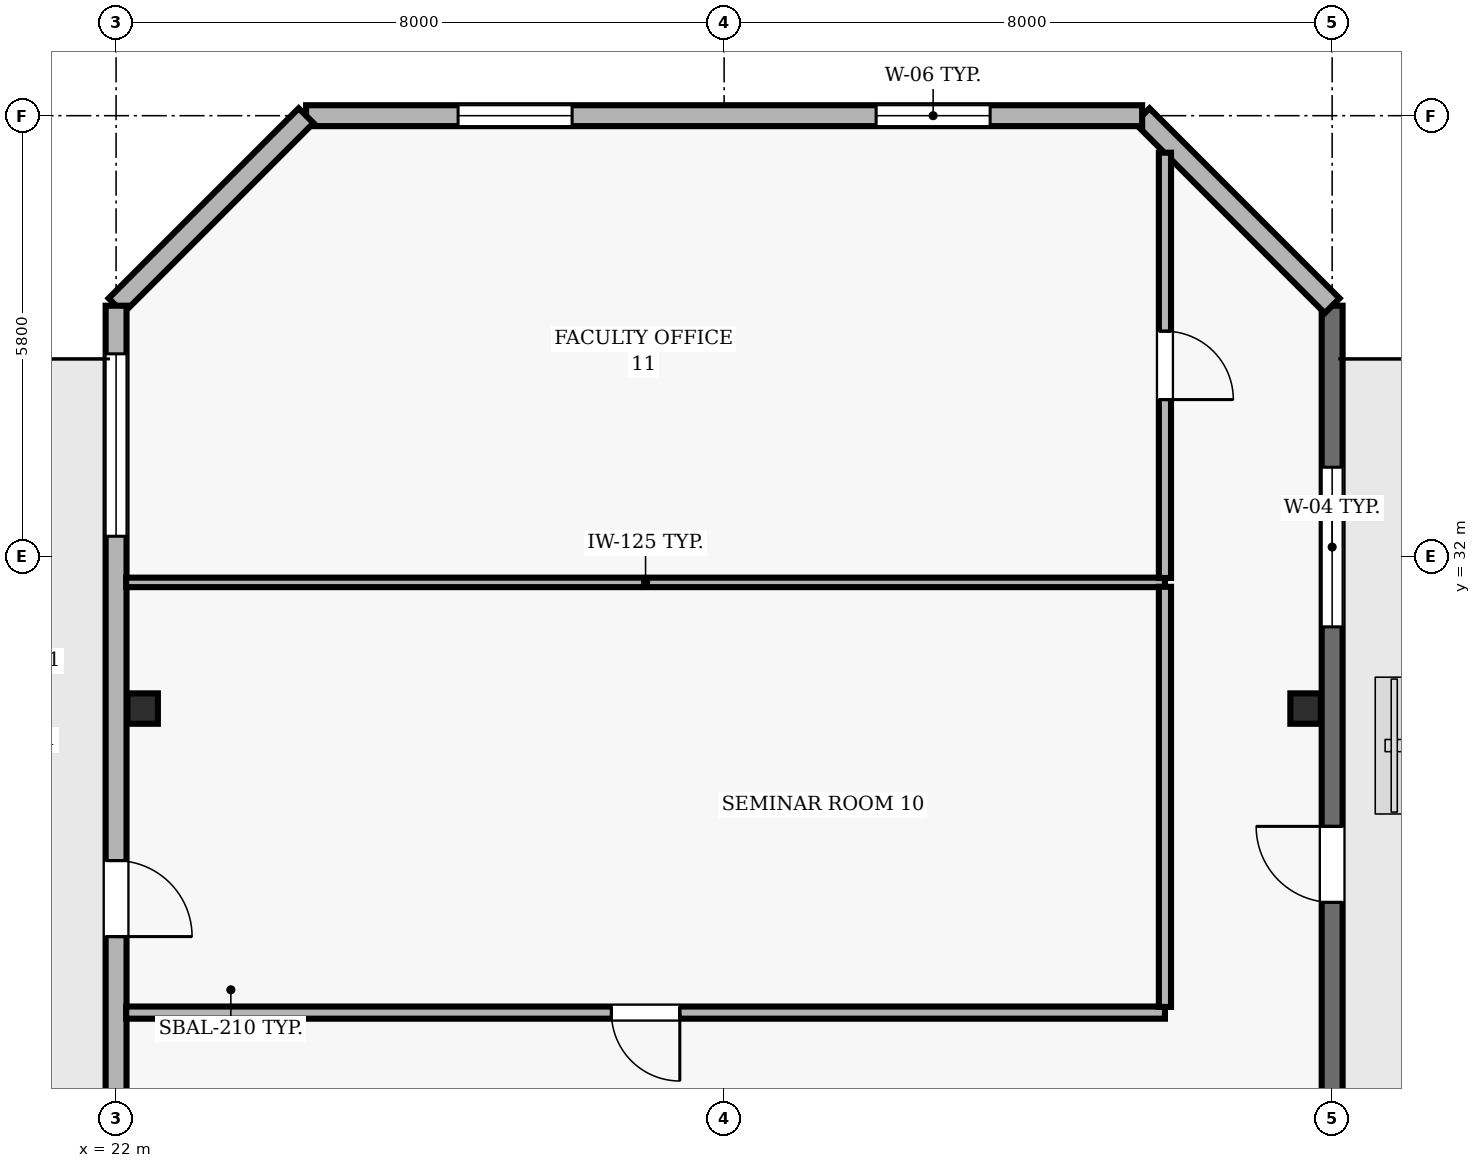
"""IFC4 building model, lengths in metres.
Left out: names, types, materials, properties, quantities, classifications, styles, units other than length and angle.
Written with IfcOpenShell. Run it as: python <this file> out.ifc"""

import sys

from ifc_helpers import new_model, si_unit, direction, frame, frame_2d, origin, origin_2d, place, context, subcontext, project, spatial, rectangle, hollow_rectangle, extrude, element, fill, save


model = new_model("IFC4")
c1 = context("Model", 3, precision=1e-05, world=origin(), true_north=direction((0.0, 1.0)))
c2 = subcontext(c1, "Body", "Model", "MODEL_VIEW")
j1 = project(units=[si_unit("LENGTHUNIT", "METRE"), si_unit("PLANEANGLEUNIT", "RADIAN")], contexts=[c1])
p1 = place(None, origin())
s1 = spatial("IfcSite", under=j1, at=p1, CompositionType="ELEMENT")
p2 = place(p1, origin())
s2 = spatial("IfcBuilding", under=s1, at=p2, CompositionType="ELEMENT")
p3 = place(p2, frame((0.0, 0.0, 275.5)))
s3 = spatial("IfcBuildingStorey", under=s2, at=p3, CompositionType="ELEMENT", Elevation=275.5)
for number, where, z_axis, x_axis in (
    (1, (22.35, 30.0, 0.0), (0.0, 0.0, 1.0), (1.0, 0.0, 0.0)),
    (2, (37.65, 30.0, 0.0), (0.0, 0.0, 1.0), (1.0, 0.0, 0.0)),
):
    element("IfcColumn", number, at=place(p3, frame(where, z_axis=z_axis, x_axis=x_axis)), inside=s3, PredefinedType="COLUMN", context=c2, shape_type="SweptSolid", body=[
        extrude(hollow_rectangle(XDim=0.4, YDim=0.4, WallThickness=0.02, at=origin_2d()), origin(), (0.0, 0.0, 1.0), 3.9),
    ])
p4 = place(p3, frame((38.0, 22.6, 0.0), z_axis=(0.0, 0.0, 1.0), x_axis=(0.0, 1.0, 0.0)))
e3 = element("IfcWall", 3, at=p4, inside=s3, PredefinedType="SOLIDWALL", context=c2, shape_type="SweptSolid", body=[
    extrude(rectangle(XDim=12.7, YDim=0.275, at=frame_2d((6.35, 0.0))), origin(), (0.0, 0.0, 1.0), 3.69),
])
p5 = place(p4, frame((4.85, 0.0, 0.0)))
e4 = element("IfcOpeningElement", 4, at=p5, cuts=e3, PredefinedType="OPENING", context=c2, shape_type="SweptSolid", body=[
    extrude(rectangle(XDim=1.0, YDim=2.2, at=frame_2d((0.5, 1.1))), frame((0.0, 0.147, 0.0), z_axis=(0.0, -1.0, 0.0), x_axis=(1.0, 0.0, 0.0)), (0.0, 0.0, 1.0), 0.295),
])
p6 = place(p4, frame((8.475, 0.0, 0.9)))
e5 = element("IfcOpeningElement", 5, at=p6, cuts=e3, PredefinedType="OPENING", context=c2, shape_type="SweptSolid", body=[
    extrude(rectangle(XDim=2.1, YDim=1.6, at=frame_2d((1.05, 0.8))), frame((0.0, 0.147, 0.0), z_axis=(0.0, -1.0, 0.0), x_axis=(1.0, 0.0, 0.0)), (0.0, 0.0, 1.0), 0.295),
])
p7 = place(p3, frame((38.0, 35.3, 0.0), z_axis=(0.0, 0.0, 1.0), x_axis=(-0.707106781187, 0.707106781187, 0.0)))
e6 = element("IfcWall", 6, at=p7, inside=s3, PredefinedType="SOLIDWALL", context=c2, shape_type="SweptSolid", body=[
    extrude(rectangle(XDim=3.536, YDim=0.275, at=frame_2d((1.768, 0.0))), origin(), (0.0, 0.0, 1.0), 3.69),
])
p8 = place(p3, frame((35.5, 37.8, 0.0), z_axis=(0.0, 0.0, 1.0), x_axis=(-1.0, 0.0, 0.0)))
e7 = element("IfcWall", 7, at=p8, inside=s3, PredefinedType="SOLIDWALL", context=c2, shape_type="SweptSolid", body=[
    extrude(rectangle(XDim=11.0, YDim=0.275, at=frame_2d((5.5, 0.0))), origin(), (0.0, 0.0, 1.0), 3.69),
])
p9 = place(p8, frame((2.0, 0.0, 0.9)))
e8 = element("IfcOpeningElement", 8, at=p9, cuts=e7, PredefinedType="OPENING", context=c2, shape_type="SweptSolid", body=[
    extrude(rectangle(XDim=1.5, YDim=1.8, at=frame_2d((0.75, 0.9))), frame((0.0, 0.147, 0.0), z_axis=(0.0, -1.0, 0.0), x_axis=(1.0, 0.0, 0.0)), (0.0, 0.0, 1.0), 0.295),
])
p10 = place(p8, frame((7.5, 0.0, 0.9)))
e9 = element("IfcOpeningElement", 9, at=p10, cuts=e7, PredefinedType="OPENING", context=c2, shape_type="SweptSolid", body=[
    extrude(rectangle(XDim=1.5, YDim=1.8, at=frame_2d((0.75, 0.9))), frame((0.0, 0.147, 0.0), z_axis=(0.0, -1.0, 0.0), x_axis=(1.0, 0.0, 0.0)), (0.0, 0.0, 1.0), 0.295),
])
p11 = place(p3, frame((24.5, 37.8, 0.0), z_axis=(0.0, 0.0, 1.0), x_axis=(-0.707106781187, -0.707106781187, 0.0)))
e10 = element("IfcWall", 10, at=p11, inside=s3, PredefinedType="SOLIDWALL", context=c2, shape_type="SweptSolid", body=[
    extrude(rectangle(XDim=3.536, YDim=0.275, at=frame_2d((1.768, 0.0))), origin(), (0.0, 0.0, 1.0), 3.69),
])
p12 = place(p3, frame((22.0, 35.3, 0.0), z_axis=(0.0, 0.0, 1.0), x_axis=(0.0, -1.0, 0.0)))
e11 = element("IfcWall", 11, at=p12, inside=s3, PredefinedType="SOLIDWALL", context=c2, shape_type="SweptSolid", body=[
    extrude(rectangle(XDim=32.8, YDim=0.275, at=frame_2d((16.4, 0.0))), origin(), (0.0, 0.0, 1.0), 3.69),
])
p13 = place(p12, frame((7.3, 0.0, 0.0)))
e12 = element("IfcOpeningElement", 12, at=p13, cuts=e11, PredefinedType="OPENING", context=c2, shape_type="SweptSolid", body=[
    extrude(rectangle(XDim=1.0, YDim=2.2, at=frame_2d((0.5, 1.1))), frame((0.0, 0.147, 0.0), z_axis=(0.0, -1.0, 0.0), x_axis=(1.0, 0.0, 0.0)), (0.0, 0.0, 1.0), 0.295),
])
p14 = place(p12, frame((0.633, 0.0, 0.9)))
e13 = element("IfcOpeningElement", 13, at=p14, cuts=e11, PredefinedType="OPENING", context=c2, shape_type="SweptSolid", body=[
    extrude(rectangle(XDim=2.4, YDim=1.8, at=frame_2d((1.2, 0.9))), frame((0.0, 0.147, 0.0), z_axis=(0.0, -1.0, 0.0), x_axis=(1.0, 0.0, 0.0)), (0.0, 0.0, 1.0), 0.295),
])
p15 = place(p12, frame((12.917, 0.0, 0.9)))
e14 = element("IfcOpeningElement", 14, at=p15, cuts=e11, PredefinedType="OPENING", context=c2, shape_type="SweptSolid", body=[
    extrude(rectangle(XDim=2.4, YDim=1.8, at=frame_2d((1.2, 0.9))), frame((0.0, 0.147, 0.0), z_axis=(0.0, -1.0, 0.0), x_axis=(1.0, 0.0, 0.0)), (0.0, 0.0, 1.0), 0.295),
])
p16 = place(p12, frame((17.483, 0.0, 0.9)))
e15 = element("IfcOpeningElement", 15, at=p16, cuts=e11, PredefinedType="OPENING", context=c2, shape_type="SweptSolid", body=[
    extrude(rectangle(XDim=2.4, YDim=1.8, at=frame_2d((1.2, 0.9))), frame((0.0, 0.147, 0.0), z_axis=(0.0, -1.0, 0.0), x_axis=(1.0, 0.0, 0.0)), (0.0, 0.0, 1.0), 0.295),
])
p17 = place(p12, frame((23.4, 0.0, 0.9)))
e16 = element("IfcOpeningElement", 16, at=p17, cuts=e11, PredefinedType="OPENING", context=c2, shape_type="SweptSolid", body=[
    extrude(rectangle(XDim=2.4, YDim=1.8, at=frame_2d((1.2, 0.9))), frame((0.0, 0.147, 0.0), z_axis=(0.0, -1.0, 0.0), x_axis=(1.0, 0.0, 0.0)), (0.0, 0.0, 1.0), 0.295),
])
p18 = place(p3, frame((35.8, 26.0, 0.0), z_axis=(0.0, 0.0, 1.0), x_axis=(-1.0, 0.0, 0.0)))
e17 = element("IfcWall", 17, at=p18, inside=s3, PredefinedType="PARTITIONING", context=c2, shape_type="SweptSolid", body=[
    extrude(rectangle(XDim=13.667, YDim=0.16, at=frame_2d((6.833, 0.0))), origin(), (0.0, 0.0, 1.0), 3.69),
])
p19 = place(p18, frame((6.383, 0.0, 0.0)))
e18 = element("IfcOpeningElement", 18, at=p19, cuts=e17, PredefinedType="OPENING", context=c2, shape_type="SweptSolid", body=[
    extrude(rectangle(XDim=0.9, YDim=2.1, at=frame_2d((0.45, 1.05))), frame((0.0, 0.09, 0.0), z_axis=(0.0, -1.0, 0.0), x_axis=(1.0, 0.0, 0.0)), (0.0, 0.0, 1.0), 0.18),
])
p20 = place(p3, frame((35.8, 31.66, 0.0), z_axis=(0.0, 0.0, 1.0), x_axis=(-1.0, 0.0, 0.0)))
e19 = element("IfcWall", 19, at=p20, inside=s3, PredefinedType="PARTITIONING", context=c2, shape_type="SweptSolid", body=[
    extrude(rectangle(XDim=13.667, YDim=0.125, at=frame_2d((6.833, 0.0))), origin(), (0.0, 0.0, 1.0), 3.69),
])
p21 = place(p3, frame((35.8, 31.602, 0.0), z_axis=(0.0, 0.0, 1.0), x_axis=(0.0, -1.0, 0.0)))
e20 = element("IfcWall", 20, at=p21, inside=s3, PredefinedType="PARTITIONING", context=c2, shape_type="SweptSolid", body=[
    extrude(rectangle(XDim=5.527, YDim=0.16, at=frame_2d((2.764, 0.0))), origin(), (0.0, 0.0, 1.0), 3.69),
])
p22 = place(p3, frame((35.8, 37.313, 0.0), z_axis=(0.0, 0.0, 1.0), x_axis=(0.0, -1.0, 0.0)))
e21 = element("IfcWall", 21, at=p22, inside=s3, PredefinedType="PARTITIONING", context=c2, shape_type="SweptSolid", body=[
    extrude(rectangle(XDim=5.595, YDim=0.16, at=frame_2d((2.797, 0.0))), origin(), (0.0, 0.0, 1.0), 3.69),
])
p23 = place(p22, frame((2.348, 0.0, 0.0)))
e22 = element("IfcOpeningElement", 22, at=p23, cuts=e21, PredefinedType="OPENING", context=c2, shape_type="SweptSolid", body=[
    extrude(rectangle(XDim=0.9, YDim=2.1, at=frame_2d((0.45, 1.05))), frame((0.0, 0.09, 0.0), z_axis=(0.0, -1.0, 0.0), x_axis=(1.0, 0.0, 0.0)), (0.0, 0.0, 1.0), 0.18),
])
p24 = place(p5, origin())
e23 = element("IfcDoor", 23, at=p24, inside=s3, OperationType="SINGLE_SWING_RIGHT", PredefinedType="DOOR", context=c2, shape_type="SweptSolid", body=[
    extrude(rectangle(XDim=1.0, YDim=2.2, at=frame_2d((0.5, 1.1))), frame((0.0, 0.025, 0.0), z_axis=(0.0, -1.0, 0.0), x_axis=(1.0, 0.0, 0.0)), (0.0, 0.0, 1.0), 0.05),
])
fill(e4, e23)
p25 = place(p6, origin())
e24 = element("IfcWindow", 24, at=p25, inside=s3, PartitioningType="SINGLE_PANEL", PredefinedType="WINDOW", context=c2, shape_type="SweptSolid", body=[
    extrude(rectangle(XDim=2.1, YDim=1.6, at=frame_2d((1.05, 0.8))), frame((0.0, 0.03, 0.0), z_axis=(0.0, -1.0, 0.0), x_axis=(1.0, 0.0, 0.0)), (0.0, 0.0, 1.0), 0.06),
])
fill(e5, e24)
p26 = place(p9, origin())
e25 = element("IfcWindow", 25, at=p26, inside=s3, PartitioningType="SINGLE_PANEL", PredefinedType="WINDOW", context=c2, shape_type="SweptSolid", body=[
    extrude(rectangle(XDim=1.5, YDim=1.8, at=frame_2d((0.75, 0.9))), frame((0.0, 0.03, 0.0), z_axis=(0.0, -1.0, 0.0), x_axis=(1.0, 0.0, 0.0)), (0.0, 0.0, 1.0), 0.06),
])
fill(e8, e25)
p27 = place(p10, origin())
e26 = element("IfcWindow", 26, at=p27, inside=s3, PartitioningType="SINGLE_PANEL", PredefinedType="WINDOW", context=c2, shape_type="SweptSolid", body=[
    extrude(rectangle(XDim=1.5, YDim=1.8, at=frame_2d((0.75, 0.9))), frame((0.0, 0.03, 0.0), z_axis=(0.0, -1.0, 0.0), x_axis=(1.0, 0.0, 0.0)), (0.0, 0.0, 1.0), 0.06),
])
fill(e9, e26)
p28 = place(p13, origin())
e27 = element("IfcDoor", 27, at=p28, inside=s3, OperationType="SINGLE_SWING_RIGHT", PredefinedType="DOOR", context=c2, shape_type="SweptSolid", body=[
    extrude(rectangle(XDim=1.0, YDim=2.2, at=frame_2d((0.5, 1.1))), frame((0.0, 0.025, 0.0), z_axis=(0.0, -1.0, 0.0), x_axis=(1.0, 0.0, 0.0)), (0.0, 0.0, 1.0), 0.05),
])
fill(e12, e27)
p29 = place(p14, origin())
e28 = element("IfcWindow", 28, at=p29, inside=s3, PartitioningType="SINGLE_PANEL", PredefinedType="WINDOW", context=c2, shape_type="SweptSolid", body=[
    extrude(rectangle(XDim=2.4, YDim=1.8, at=frame_2d((1.2, 0.9))), frame((0.0, 0.03, 0.0), z_axis=(0.0, -1.0, 0.0), x_axis=(1.0, 0.0, 0.0)), (0.0, 0.0, 1.0), 0.06),
])
fill(e13, e28)
p30 = place(p19, origin())
e29 = element("IfcDoor", 29, at=p30, inside=s3, OperationType="SINGLE_SWING_LEFT", PredefinedType="DOOR", context=c2, shape_type="SweptSolid", body=[
    extrude(rectangle(XDim=0.9, YDim=2.1, at=frame_2d((0.45, 1.05))), frame((0.0, 0.025, 0.0), z_axis=(0.0, -1.0, 0.0), x_axis=(1.0, 0.0, 0.0)), (0.0, 0.0, 1.0), 0.05),
])
fill(e18, e29)
p31 = place(p23, origin())
e30 = element("IfcDoor", 30, at=p31, inside=s3, OperationType="SINGLE_SWING_RIGHT", PredefinedType="DOOR", context=c2, shape_type="SweptSolid", body=[
    extrude(rectangle(XDim=0.9, YDim=2.1, at=frame_2d((0.45, 1.05))), frame((0.0, 0.025, 0.0), z_axis=(0.0, -1.0, 0.0), x_axis=(1.0, 0.0, 0.0)), (0.0, 0.0, 1.0), 0.05),
])
fill(e22, e30)
save(model, sys.argv[1])
